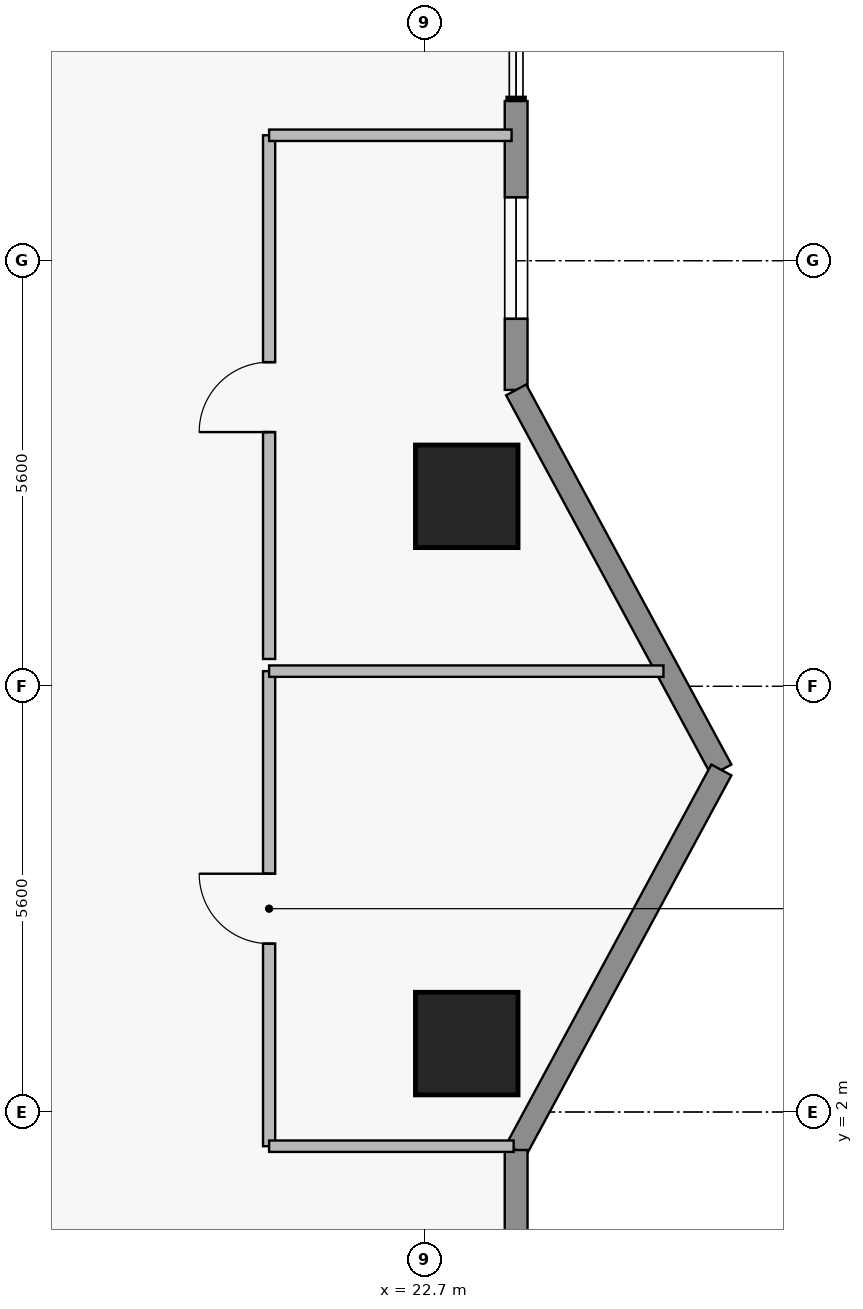
"""IFC4 building model, lengths in metres.
Left out: names, types, materials, properties, quantities, classifications, styles, units other than length and angle.
Written with IfcOpenShell. Run it as: python <this file> out.ifc"""

import sys

from ifc_helpers import new_model, si_unit, direction, frame, frame_2d, origin, origin_2d, place, context, subcontext, project, spatial, rectangle, extrude, element, fill, save


model = new_model("IFC4")
c1 = context("Model", 3, precision=1e-05, world=origin(), true_north=direction((0.0, 1.0)))
c2 = subcontext(c1, "Body", "Model", "MODEL_VIEW")
j1 = project(units=[si_unit("LENGTHUNIT", "METRE"), si_unit("PLANEANGLEUNIT", "RADIAN")], contexts=[c1])
p1 = place(None, origin())
s1 = spatial("IfcSite", under=j1, at=p1, CompositionType="ELEMENT")
p2 = place(p1, origin())
s2 = spatial("IfcBuilding", under=s1, at=p2, CompositionType="ELEMENT")
p3 = place(p2, frame((0.0, 0.0, 95.65)))
s3 = spatial("IfcBuildingStorey", under=s2, at=p3, CompositionType="ELEMENT", Elevation=95.65)
for number, where, z_axis, x_axis in (
    (1, (23.25, 2.9, 0.43), (0.0, 0.0, 1.0), (1.0, 0.0, 0.0)),
    (2, (23.25, 10.1, 0.43), (0.0, 0.0, 1.0), (1.0, 0.0, 0.0)),
):
    element("IfcColumn", number, at=place(p3, frame(where, z_axis=z_axis, x_axis=x_axis)), inside=s3, PredefinedType="COLUMN", context=c2, shape_type="SweptSolid", body=[
        extrude(rectangle(XDim=1.35, YDim=1.35, at=origin_2d()), origin(), (0.0, 0.0, 1.0), 3.22),
    ])
p4 = place(p3, frame((23.9, 15.3, 0.0), z_axis=(0.0, 0.0, 1.0), x_axis=(0.0, -1.0, 0.0)))
e3 = element("IfcWall", 3, at=p4, inside=s3, PredefinedType="STANDARD", context=c2, shape_type="SweptSolid", body=[
    extrude(rectangle(XDim=3.8, YDim=0.3, at=frame_2d((1.9, 0.0))), origin(), (0.0, 0.0, 1.0), 3.43),
])
p5 = place(p4, frame((1.265, 0.0, 0.85)))
e4 = element("IfcOpeningElement", 4, at=p5, cuts=e3, PredefinedType="OPENING", context=c2, shape_type="SweptSolid", body=[
    extrude(rectangle(XDim=1.6, YDim=1.8, at=frame_2d((0.8, 0.9))), frame((0.0, 0.16, 0.0), z_axis=(0.0, -1.0, 0.0), x_axis=(1.0, 0.0, 0.0)), (0.0, 0.0, 1.0), 0.32),
])
for number, where, z_axis, x_axis in (
    (5, (23.9, 11.5, 0.0), (0.0, 0.0, 1.0), (0.475, -0.88, 0.0)),
    (6, (26.6, 6.5, 0.0), (0.0, 0.0, 1.0), (-0.475, -0.88, 0.0)),
):
    element("IfcWall", number, at=place(p3, frame(where, z_axis=z_axis, x_axis=x_axis)), inside=s3, PredefinedType="STANDARD", context=c2, shape_type="SweptSolid", body=[
        extrude(rectangle(XDim=5.683, YDim=0.3, at=frame_2d((2.841, 0.0))), origin(), (0.0, 0.0, 1.0), 3.43),
    ])
p6 = place(p3, frame((23.9, 1.5, 0.0), z_axis=(0.0, 0.0, 1.0), x_axis=(0.0, -1.0, 0.0)))
e7 = element("IfcWall", 7, at=p6, inside=s3, PredefinedType="STANDARD", context=c2, shape_type="SweptSolid", body=[
    extrude(rectangle(XDim=1.15, YDim=0.3, at=frame_2d((0.575, 0.0))), origin(), (0.0, 0.0, 1.0), 3.43),
])
p7 = place(p3, frame((20.65, 1.55, 0.0), z_axis=(0.0, 0.0, 1.0), x_axis=(0.0, 1.0, 0.0)))
e8 = element("IfcWall", 8, at=p7, inside=s3, PredefinedType="PARTITIONING", context=c2, shape_type="SweptSolid", body=[
    extrude(rectangle(XDim=6.25, YDim=0.16, at=frame_2d((3.125, 0.0))), origin(), (0.0, 0.0, 1.0), 3.43),
])
p8 = place(p7, frame((2.665, 0.0, 0.0)))
e9 = element("IfcOpeningElement", 9, at=p8, cuts=e8, PredefinedType="OPENING", context=c2, shape_type="SweptSolid", body=[
    extrude(rectangle(XDim=0.92, YDim=2.12, at=frame_2d((0.46, 1.06))), frame((0.0, 0.09, 0.0), z_axis=(0.0, -1.0, 0.0), x_axis=(1.0, 0.0, 0.0)), (0.0, 0.0, 1.0), 0.18),
])
p9 = place(p3, frame((20.65, 7.96, 0.0), z_axis=(0.0, 0.0, 1.0), x_axis=(0.0, 1.0, 0.0)))
e10 = element("IfcWall", 10, at=p9, inside=s3, PredefinedType="PARTITIONING", context=c2, shape_type="SweptSolid", body=[
    extrude(rectangle(XDim=6.89, YDim=0.16, at=frame_2d((3.445, 0.0))), origin(), (0.0, 0.0, 1.0), 3.43),
])
p10 = place(p9, frame((2.985, 0.0, 0.0)))
e11 = element("IfcOpeningElement", 11, at=p10, cuts=e10, PredefinedType="OPENING", context=c2, shape_type="SweptSolid", body=[
    extrude(rectangle(XDim=0.92, YDim=2.12, at=frame_2d((0.46, 1.06))), frame((0.0, 0.09, 0.0), z_axis=(0.0, -1.0, 0.0), x_axis=(1.0, 0.0, 0.0)), (0.0, 0.0, 1.0), 0.18),
])
p11 = place(p3, frame((20.65, 1.55, 0.0), z_axis=(0.0, 0.0, 1.0), x_axis=(1.0, 0.0, 0.0)))
e12 = element("IfcWall", 12, at=p11, inside=s3, PredefinedType="PARTITIONING", context=c2, shape_type="SweptSolid", body=[
    extrude(rectangle(XDim=3.217, YDim=0.15, at=frame_2d((1.608, 0.0))), origin(), (0.0, 0.0, 1.0), 3.43),
])
p12 = place(p3, frame((20.65, 7.8, 0.0), z_axis=(0.0, 0.0, 1.0), x_axis=(1.0, 0.0, 0.0)))
e13 = element("IfcWall", 13, at=p12, inside=s3, PredefinedType="PARTITIONING", context=c2, shape_type="SweptSolid", body=[
    extrude(rectangle(XDim=5.188, YDim=0.15, at=frame_2d((2.594, 0.0))), origin(), (0.0, 0.0, 1.0), 3.43),
])
p13 = place(p3, frame((20.65, 14.85, 0.0), z_axis=(0.0, 0.0, 1.0), x_axis=(1.0, 0.0, 0.0)))
e14 = element("IfcWall", 14, at=p13, inside=s3, PredefinedType="PARTITIONING", context=c2, shape_type="SweptSolid", body=[
    extrude(rectangle(XDim=3.19, YDim=0.15, at=frame_2d((1.595, 0.0))), origin(), (0.0, 0.0, 1.0), 3.43),
])
p14 = place(p5, origin())
e15 = element("IfcWindow", 15, at=p14, inside=s3, PartitioningType="SINGLE_PANEL", PredefinedType="WINDOW", context=c2, shape_type="SweptSolid", body=[
    extrude(rectangle(XDim=1.6, YDim=1.8, at=frame_2d((0.8, 0.9))), frame((0.0, 0.03, 0.0), z_axis=(0.0, -1.0, 0.0), x_axis=(1.0, 0.0, 0.0)), (0.0, 0.0, 1.0), 0.06),
])
fill(e4, e15)
p15 = place(p8, origin())
e16 = element("IfcDoor", 16, at=p15, inside=s3, OperationType="SINGLE_SWING_RIGHT", PredefinedType="DOOR", context=c2, shape_type="SweptSolid", body=[
    extrude(rectangle(XDim=0.92, YDim=2.12, at=frame_2d((0.46, 1.06))), frame((0.0, 0.025, 0.0), z_axis=(0.0, -1.0, 0.0), x_axis=(1.0, 0.0, 0.0)), (0.0, 0.0, 1.0), 0.05),
])
fill(e9, e16)
p16 = place(p10, origin())
e17 = element("IfcDoor", 17, at=p16, inside=s3, OperationType="SINGLE_SWING_LEFT", PredefinedType="DOOR", context=c2, shape_type="SweptSolid", body=[
    extrude(rectangle(XDim=0.92, YDim=2.12, at=frame_2d((0.46, 1.06))), frame((0.0, 0.025, 0.0), z_axis=(0.0, -1.0, 0.0), x_axis=(1.0, 0.0, 0.0)), (0.0, 0.0, 1.0), 0.05),
])
fill(e11, e17)
save(model, sys.argv[1])
